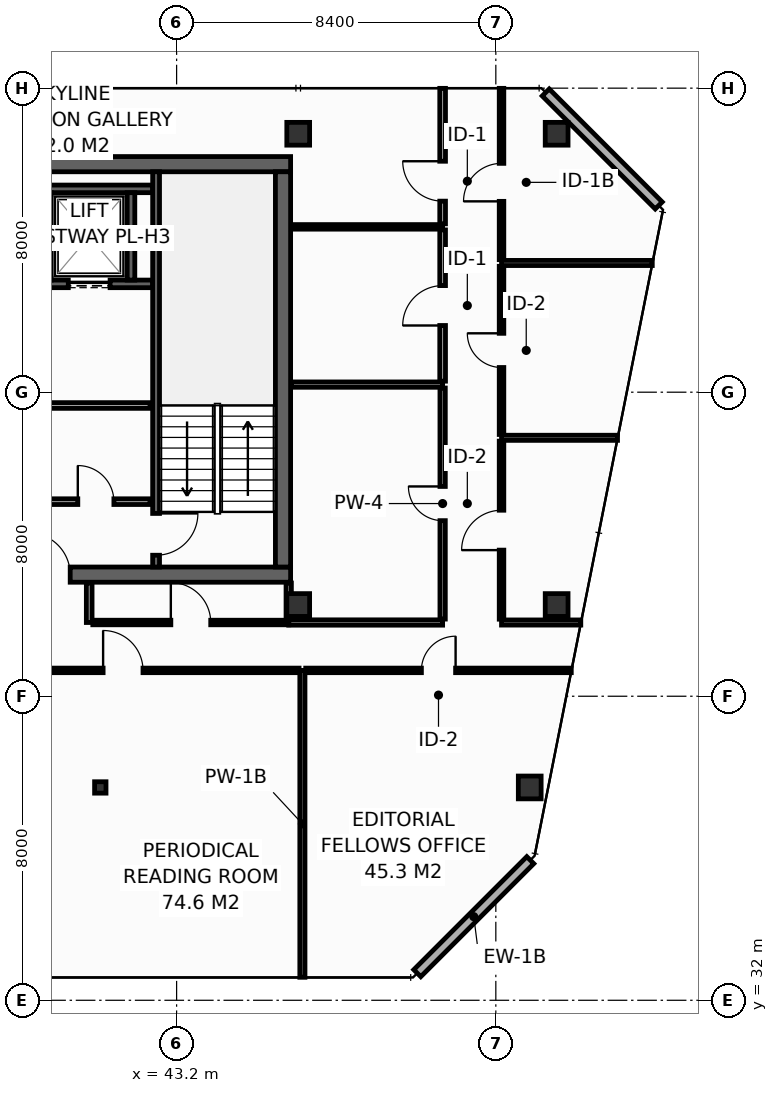
"""IFC4 building model, lengths in metres.
Left out: names, types, materials, properties, quantities, classifications, styles, units other than length and angle.
Written with IfcOpenShell. Run it as: python <this file> out.ifc"""

import sys

from ifc_helpers import new_model, si_unit, direction, frame, frame_2d, origin, origin_2d, place, context, subcontext, project, spatial, rectangle, hollow_rectangle, extrude, element, fill, save


model = new_model("IFC4")
c1 = context("Model", 3, precision=1e-05, world=origin(), true_north=direction((0.0, 1.0)))
c2 = subcontext(c1, "Body", "Model", "MODEL_VIEW")
j1 = project(units=[si_unit("LENGTHUNIT", "METRE"), si_unit("PLANEANGLEUNIT", "RADIAN")], contexts=[c1])
p1 = place(None, origin())
s1 = spatial("IfcSite", under=j1, at=p1, CompositionType="ELEMENT")
p2 = place(p1, origin())
s2 = spatial("IfcBuilding", under=s1, at=p2, CompositionType="ELEMENT")
p3 = place(p2, frame((0.0, 0.0, 299.0)))
s3 = spatial("IfcBuildingStorey", under=s2, at=p3, CompositionType="ELEMENT", Elevation=299.0)
p4 = place(p3, frame((13.7, 43.2, 0.0), z_axis=(0.0, 0.0, 1.0), x_axis=(1.0, 0.0, 0.0)))
e1 = element("IfcWall", 1, at=p4, inside=s3, PredefinedType="SHEAR", context=c2, shape_type="SweptSolid", body=[
    extrude(rectangle(XDim=32.5, YDim=0.4, at=frame_2d((16.25, 0.0))), origin(), (0.0, 0.0, 1.0), 3.55),
])
p5 = place(p4, frame((5.4, 0.0, 0.0)))
e2 = element("IfcOpeningElement", 2, at=p5, cuts=e1, PredefinedType="OPENING", context=c2, shape_type="SweptSolid", body=[
    extrude(rectangle(XDim=1.1, YDim=2.15, at=frame_2d((0.55, 1.075))), frame((0.0, 0.21, 0.0), z_axis=(0.0, -1.0, 0.0), x_axis=(1.0, 0.0, 0.0)), (0.0, 0.0, 1.0), 0.42),
])
p6 = place(p4, frame((25.6, 0.0, 0.0)))
e3 = element("IfcOpeningElement", 3, at=p6, cuts=e1, PredefinedType="OPENING", context=c2, shape_type="SweptSolid", body=[
    extrude(rectangle(XDim=1.1, YDim=2.15, at=frame_2d((0.55, 1.075))), frame((0.0, 0.21, 0.0), z_axis=(0.0, -1.0, 0.0), x_axis=(1.0, 0.0, 0.0)), (0.0, 0.0, 1.0), 0.42),
])
p7 = place(p3, frame((13.7, 54.0, 0.0), z_axis=(0.0, 0.0, 1.0), x_axis=(1.0, 0.0, 0.0)))
e4 = element("IfcWall", 4, at=p7, inside=s3, PredefinedType="SHEAR", context=c2, shape_type="SweptSolid", body=[
    extrude(rectangle(XDim=32.5, YDim=0.4, at=frame_2d((16.25, 0.0))), origin(), (0.0, 0.0, 1.0), 3.55),
])
p8 = place(p3, frame((46.0, 43.4, 0.0), z_axis=(0.0, 0.0, 1.0), x_axis=(0.0, 1.0, 0.0)))
e5 = element("IfcWall", 5, at=p8, inside=s3, PredefinedType="SHEAR", context=c2, shape_type="SweptSolid", body=[
    extrude(rectangle(XDim=10.4, YDim=0.4, at=frame_2d((5.2, 0.0))), origin(), (0.0, 0.0, 1.0), 3.55),
])
for number, where, z_axis, x_axis in (
    (6, (46.4, 54.8, 0.0), (0.0, 0.0, 1.0), (1.0, 0.0, 0.0)),
    (7, (53.2, 54.8, 0.0), (0.0, 0.0, 1.0), (1.0, 0.0, 0.0)),
    (8, (46.4, 42.4, 0.0), (0.0, 0.0, 1.0), (1.0, 0.0, 0.0)),
    (9, (53.2, 42.4, 0.0), (0.0, 0.0, 1.0), (1.0, 0.0, 0.0)),
    (10, (52.492, 37.6, 0.0), (0.0, 0.0, 1.0), (1.0, 0.0, 0.0)),
):
    element("IfcColumn", number, at=place(p3, frame(where, z_axis=z_axis, x_axis=x_axis)), inside=s3, PredefinedType="COLUMN", context=c2, shape_type="SweptSolid", body=[
        extrude(hollow_rectangle(XDim=0.6, YDim=0.6, WallThickness=0.028, at=origin_2d()), origin(), (0.0, 0.0, 1.0), 3.8),
    ])
p9 = place(p3, frame((41.192, 37.6, 0.0), z_axis=(0.0, 0.0, 1.0), x_axis=(1.0, 0.0, 0.0)))
e11 = element("IfcColumn", 11, at=p9, inside=s3, PredefinedType="COLUMN", context=c2, shape_type="SweptSolid", body=[
    extrude(hollow_rectangle(XDim=0.3, YDim=0.3, WallThickness=0.012, at=origin_2d()), origin(), (0.0, 0.0, 1.0), 3.8),
])
p10 = place(p3, frame((39.525, 50.85, 0.0), z_axis=(0.0, 0.0, 1.0), x_axis=(1.0, 0.0, 0.0)))
e12 = element("IfcWall", 12, at=p10, inside=s3, PredefinedType="SHEAR", context=c2, shape_type="SweptSolid", body=[
    extrude(rectangle(XDim=3.045, YDim=0.2, at=frame_2d((1.522, 0.0))), origin(), (0.0, 0.0, 1.0), 3.55),
])
p11 = place(p10, frame((0.825, 0.0, 0.0)))
e13 = element("IfcOpeningElement", 13, at=p11, cuts=e12, PredefinedType="OPENING", context=c2, shape_type="SweptSolid", body=[
    extrude(rectangle(XDim=1.1, YDim=2.2, at=frame_2d((0.55, 1.1))), frame((0.0, 0.11, 0.0), z_axis=(0.0, -1.0, 0.0), x_axis=(1.0, 0.0, 0.0)), (0.0, 0.0, 1.0), 0.22),
])
p12 = place(p3, frame((39.525, 53.35, 0.0), z_axis=(0.0, 0.0, 1.0), x_axis=(1.0, 0.0, 0.0)))
e14 = element("IfcWall", 14, at=p12, inside=s3, PredefinedType="SHEAR", context=c2, shape_type="SweptSolid", body=[
    extrude(rectangle(XDim=3.045, YDim=0.2, at=frame_2d((1.522, 0.0))), origin(), (0.0, 0.0, 1.0), 3.55),
])
p13 = place(p3, frame((42.0, 50.95, 0.0), z_axis=(0.0, 0.0, 1.0), x_axis=(0.0, 1.0, 0.0)))
e15 = element("IfcWall", 15, at=p13, inside=s3, PredefinedType="SHEAR", context=c2, shape_type="SweptSolid", body=[
    extrude(rectangle(XDim=2.3, YDim=0.2, at=frame_2d((1.15, 0.0))), origin(), (0.0, 0.0, 1.0), 3.55),
])
p14 = place(p3, frame((42.66, 53.8, 0.0), z_axis=(0.0, 0.0, 1.0), x_axis=(0.0, -1.0, 0.0)))
e16 = element("IfcWall", 16, at=p14, inside=s3, PredefinedType="SHEAR", context=c2, shape_type="SweptSolid", body=[
    extrude(rectangle(XDim=10.4, YDim=0.18, at=frame_2d((5.2, 0.0))), origin(), (0.0, 0.0, 1.0), 3.55),
])
p15 = place(p14, frame((8.99, 0.0, 0.0)))
e17 = element("IfcOpeningElement", 17, at=p15, cuts=e16, PredefinedType="OPENING", context=c2, shape_type="SweptSolid", body=[
    extrude(rectangle(XDim=1.1, YDim=2.15, at=frame_2d((0.55, 1.075))), frame((0.0, 0.1, 0.0), z_axis=(0.0, -1.0, 0.0), x_axis=(1.0, 0.0, 0.0)), (0.0, 0.0, 1.0), 0.2),
])
p16 = place(p3, frame((33.95, 45.12, 0.0), z_axis=(0.0, 0.0, 1.0), x_axis=(1.0, 0.0, 0.0)))
e18 = element("IfcWall", 18, at=p16, inside=s3, PredefinedType="PARTITIONING", context=c2, shape_type="SweptSolid", body=[
    extrude(rectangle(XDim=8.55, YDim=0.15, at=frame_2d((4.275, 0.0))), origin(), (0.0, 0.0, 1.0), 3.55),
])
p17 = place(p16, frame((0.95, 0.0, 0.0)))
e19 = element("IfcOpeningElement", 19, at=p17, cuts=e18, PredefinedType="OPENING", context=c2, shape_type="SweptSolid", body=[
    extrude(rectangle(XDim=0.95, YDim=2.15, at=frame_2d((0.475, 1.075))), frame((0.0, 0.085, 0.0), z_axis=(0.0, -1.0, 0.0), x_axis=(1.0, 0.0, 0.0)), (0.0, 0.0, 1.0), 0.17),
])
p18 = place(p16, frame((3.8, 0.0, 0.0)))
e20 = element("IfcOpeningElement", 20, at=p18, cuts=e18, PredefinedType="OPENING", context=c2, shape_type="SweptSolid", body=[
    extrude(rectangle(XDim=0.95, YDim=2.15, at=frame_2d((0.475, 1.075))), frame((0.0, 0.085, 0.0), z_axis=(0.0, -1.0, 0.0), x_axis=(1.0, 0.0, 0.0)), (0.0, 0.0, 1.0), 0.17),
])
p19 = place(p16, frame((6.65, 0.0, 0.0)))
e21 = element("IfcOpeningElement", 21, at=p19, cuts=e18, PredefinedType="OPENING", context=c2, shape_type="SweptSolid", body=[
    extrude(rectangle(XDim=0.95, YDim=2.15, at=frame_2d((0.475, 1.075))), frame((0.0, 0.085, 0.0), z_axis=(0.0, -1.0, 0.0), x_axis=(1.0, 0.0, 0.0)), (0.0, 0.0, 1.0), 0.17),
])
p20 = place(p3, frame((33.95, 47.65, 0.0), z_axis=(0.0, 0.0, 1.0), x_axis=(1.0, 0.0, 0.0)))
e22 = element("IfcWall", 22, at=p20, inside=s3, PredefinedType="PARTITIONING", context=c2, shape_type="SweptSolid", body=[
    extrude(rectangle(XDim=8.55, YDim=0.15, at=frame_2d((4.275, 0.0))), origin(), (0.0, 0.0, 1.0), 3.55),
])
p21 = place(p3, frame((49.533, 32.713, 0.0), z_axis=(0.0, 0.0, 1.0), x_axis=(0.70707775441, 0.707135806771, 0.0)))
e23 = element("IfcWall", 23, at=p21, inside=s3, PredefinedType="STANDARD", context=c2, shape_type="SweptSolid", body=[
    extrude(rectangle(XDim=4.206, YDim=0.26, at=frame_2d((2.103, 0.0))), origin(), (0.0, 0.0, 1.0), 3.55),
])
p22 = place(p3, frame((55.887, 52.913, 0.0), z_axis=(0.0, 0.0, 1.0), x_axis=(-0.707106781187, 0.707106781187, 0.0)))
e24 = element("IfcWall", 24, at=p22, inside=s3, PredefinedType="STANDARD", context=c2, shape_type="SweptSolid", body=[
    extrude(rectangle(XDim=4.206, YDim=0.26, at=frame_2d((2.103, 0.0))), origin(), (0.0, 0.0, 1.0), 3.55),
])
p23 = place(p3, frame((46.15, 41.94, 0.0), z_axis=(0.0, 0.0, 1.0), x_axis=(1.0, 0.0, 0.0)))
e25 = element("IfcWall", 25, at=p23, inside=s3, PredefinedType="PARTITIONING", context=c2, shape_type="SweptSolid", body=[
    extrude(rectangle(XDim=4.05, YDim=0.14, at=frame_2d((2.025, 0.0))), origin(), (0.0, 0.0, 1.0), 3.55),
])
p24 = place(p3, frame((46.15, 42.03, 0.0), z_axis=(0.0, 0.0, 1.0), x_axis=(0.0, 1.0, 0.0)))
e26 = element("IfcWall", 26, at=p24, inside=s3, PredefinedType="PARTITIONING", context=c2, shape_type="SweptSolid", body=[
    extrude(rectangle(XDim=0.95, YDim=0.14, at=frame_2d((0.475, 0.0))), origin(), (0.0, 0.0, 1.0), 3.55),
])
p25 = place(p3, frame((46.22, 48.2, 0.0), z_axis=(0.0, 0.0, 1.0), x_axis=(1.0, 0.0, 0.0)))
e27 = element("IfcWall", 27, at=p25, inside=s3, PredefinedType="PARTITIONING", context=c2, shape_type="SweptSolid", body=[
    extrude(rectangle(XDim=3.98, YDim=0.14, at=frame_2d((1.99, 0.0))), origin(), (0.0, 0.0, 1.0), 3.55),
])
p26 = place(p3, frame((50.2, 42.03, 0.0), z_axis=(0.0, 0.0, 1.0), x_axis=(0.0, 1.0, 0.0)))
e28 = element("IfcWall", 28, at=p26, inside=s3, PredefinedType="PARTITIONING", context=c2, shape_type="SweptSolid", body=[
    extrude(rectangle(XDim=6.08, YDim=0.14, at=frame_2d((3.04, 0.0))), origin(), (0.0, 0.0, 1.0), 2.947),
])
p27 = place(p26, frame((2.59, 0.0, 0.0)))
e29 = element("IfcOpeningElement", 29, at=p27, cuts=e28, PredefinedType="OPENING", context=c2, shape_type="SweptSolid", body=[
    extrude(rectangle(XDim=0.9, YDim=2.1, at=frame_2d((0.45, 1.05))), frame((0.0, 0.08, 0.0), z_axis=(0.0, -1.0, 0.0), x_axis=(1.0, 0.0, 0.0)), (0.0, 0.0, 1.0), 0.16),
])
p28 = place(p3, frame((46.22, 52.35, 0.0), z_axis=(0.0, 0.0, 1.0), x_axis=(1.0, 0.0, 0.0)))
e30 = element("IfcWall", 30, at=p28, inside=s3, PredefinedType="PARTITIONING", context=c2, shape_type="SweptSolid", body=[
    extrude(rectangle(XDim=3.98, YDim=0.12, at=frame_2d((1.99, 0.0))), origin(), (0.0, 0.0, 1.0), 3.55),
])
p29 = place(p3, frame((50.2, 48.29, 0.0), z_axis=(0.0, 0.0, 1.0), x_axis=(0.0, 1.0, 0.0)))
e31 = element("IfcWall", 31, at=p29, inside=s3, PredefinedType="PARTITIONING", context=c2, shape_type="SweptSolid", body=[
    extrude(rectangle(XDim=3.98, YDim=0.15, at=frame_2d((1.99, 0.0))), origin(), (0.0, 0.0, 1.0), 3.55),
])
p30 = place(p29, frame((1.465, 0.0, 0.0)))
e32 = element("IfcOpeningElement", 32, at=p30, cuts=e31, PredefinedType="OPENING", context=c2, shape_type="SweptSolid", body=[
    extrude(rectangle(XDim=1.05, YDim=2.15, at=frame_2d((0.525, 1.075))), frame((0.0, 0.085, 0.0), z_axis=(0.0, -1.0, 0.0), x_axis=(1.0, 0.0, 0.0)), (0.0, 0.0, 1.0), 0.17),
])
p31 = place(p3, frame((50.2, 52.43, 0.0), z_axis=(0.0, 0.0, 1.0), x_axis=(0.0, 1.0, 0.0)))
e33 = element("IfcWall", 33, at=p31, inside=s3, PredefinedType="PARTITIONING", context=c2, shape_type="SweptSolid", body=[
    extrude(rectangle(XDim=3.565, YDim=0.15, at=frame_2d((1.783, 0.0))), origin(), (0.0, 0.0, 1.0), 2.935),
])
p32 = place(p31, frame((0.597, 0.0, 0.0)))
e34 = element("IfcOpeningElement", 34, at=p32, cuts=e33, PredefinedType="OPENING", context=c2, shape_type="SweptSolid", body=[
    extrude(rectangle(XDim=1.05, YDim=2.15, at=frame_2d((0.525, 1.075))), frame((0.0, 0.085, 0.0), z_axis=(0.0, -1.0, 0.0), x_axis=(1.0, 0.0, 0.0)), (0.0, 0.0, 1.0), 0.17),
])
p33 = place(p3, frame((51.75, 41.94, 0.0), z_axis=(0.0, 0.0, 1.0), x_axis=(1.0, 0.0, 0.0)))
e35 = element("IfcWall", 35, at=p33, inside=s3, PredefinedType="PARTITIONING", context=c2, shape_type="SweptSolid", body=[
    extrude(rectangle(XDim=2.086, YDim=0.135, at=frame_2d((1.043, 0.0))), origin(), (0.0, 0.0, 1.0), 3.085),
])
p34 = place(p3, frame((51.75, 46.8, 0.0), z_axis=(0.0, 0.0, 1.0), x_axis=(1.0, 0.0, 0.0)))
e36 = element("IfcWall", 36, at=p34, inside=s3, PredefinedType="PARTITIONING", context=c2, shape_type="SweptSolid", body=[
    extrude(rectangle(XDim=3.052, YDim=0.135, at=frame_2d((1.526, 0.0))), origin(), (0.0, 0.0, 1.0), 2.947),
])
p35 = place(p3, frame((51.75, 51.4, 0.0), z_axis=(0.0, 0.0, 1.0), x_axis=(1.0, 0.0, 0.0)))
e37 = element("IfcWall", 37, at=p35, inside=s3, PredefinedType="PARTITIONING", context=c2, shape_type="SweptSolid", body=[
    extrude(rectangle(XDim=3.967, YDim=0.135, at=frame_2d((1.983, 0.0))), origin(), (0.0, 0.0, 1.0), 2.947),
])
p36 = place(p3, frame((51.75, 42.028, 0.0), z_axis=(0.0, 0.0, 1.0), x_axis=(0.0, 1.0, 0.0)))
e38 = element("IfcWall", 38, at=p36, inside=s3, PredefinedType="PARTITIONING", context=c2, shape_type="SweptSolid", body=[
    extrude(rectangle(XDim=4.685, YDim=0.12, at=frame_2d((2.342, 0.0))), origin(), (0.0, 0.0, 1.0), 2.947),
])
p37 = place(p36, frame((1.817, 0.0, 0.0)))
e39 = element("IfcOpeningElement", 39, at=p37, cuts=e38, PredefinedType="OPENING", context=c2, shape_type="SweptSolid", body=[
    extrude(rectangle(XDim=1.05, YDim=2.15, at=frame_2d((0.525, 1.075))), frame((0.0, 0.07, 0.0), z_axis=(0.0, -1.0, 0.0), x_axis=(1.0, 0.0, 0.0)), (0.0, 0.0, 1.0), 0.14),
])
p38 = place(p3, frame((51.75, 46.887, 0.0), z_axis=(0.0, 0.0, 1.0), x_axis=(0.0, 1.0, 0.0)))
e40 = element("IfcWall", 40, at=p38, inside=s3, PredefinedType="PARTITIONING", context=c2, shape_type="SweptSolid", body=[
    extrude(rectangle(XDim=4.425, YDim=0.12, at=frame_2d((2.212, 0.0))), origin(), (0.0, 0.0, 1.0), 3.55),
])
p39 = place(p38, frame((1.762, 0.0, 0.0)))
e41 = element("IfcOpeningElement", 41, at=p39, cuts=e40, PredefinedType="OPENING", context=c2, shape_type="SweptSolid", body=[
    extrude(rectangle(XDim=0.9, YDim=2.1, at=frame_2d((0.45, 1.05))), frame((0.0, 0.07, 0.0), z_axis=(0.0, -1.0, 0.0), x_axis=(1.0, 0.0, 0.0)), (0.0, 0.0, 1.0), 0.14),
])
p40 = place(p3, frame((51.75, 51.488, 0.0), z_axis=(0.0, 0.0, 1.0), x_axis=(0.0, 1.0, 0.0)))
e42 = element("IfcWall", 42, at=p40, inside=s3, PredefinedType="PARTITIONING", context=c2, shape_type="SweptSolid", body=[
    extrude(rectangle(XDim=4.508, YDim=0.12, at=frame_2d((2.254, 0.0))), origin(), (0.0, 0.0, 1.0), 2.935),
])
p41 = place(p40, frame((1.534, 0.0, 0.0)))
e43 = element("IfcOpeningElement", 43, at=p41, cuts=e42, PredefinedType="OPENING", context=c2, shape_type="SweptSolid", body=[
    extrude(rectangle(XDim=1.0, YDim=2.15, at=frame_2d((0.5, 1.075))), frame((0.0, 0.07, 0.0), z_axis=(0.0, -1.0, 0.0), x_axis=(1.0, 0.0, 0.0)), (0.0, 0.0, 1.0), 0.14),
])
p42 = place(p3, frame((40.9, 41.94, 0.0), z_axis=(0.0, 0.0, 1.0), x_axis=(0.0, 1.0, 0.0)))
e44 = element("IfcWall", 44, at=p42, inside=s3, PredefinedType="PARTITIONING", context=c2, shape_type="SweptSolid", body=[
    extrude(rectangle(XDim=1.04, YDim=0.15, at=frame_2d((0.52, 0.0))), origin(), (0.0, 0.0, 1.0), 3.55),
])
p43 = place(p3, frame((40.995, 41.94, 0.0), z_axis=(0.0, 0.0, 1.0), x_axis=(1.0, 0.0, 0.0)))
e45 = element("IfcWall", 45, at=p43, inside=s3, PredefinedType="PARTITIONING", context=c2, shape_type="SweptSolid", body=[
    extrude(rectangle(XDim=5.155, YDim=0.12, at=frame_2d((2.577, 0.0))), origin(), (0.0, 0.0, 1.0), 3.55),
])
p44 = place(p43, frame((2.053, 0.0, 0.0)))
e46 = element("IfcOpeningElement", 46, at=p44, cuts=e45, PredefinedType="OPENING", context=c2, shape_type="SweptSolid", body=[
    extrude(rectangle(XDim=1.05, YDim=2.15, at=frame_2d((0.525, 1.075))), frame((0.0, 0.07, 0.0), z_axis=(0.0, -1.0, 0.0), x_axis=(1.0, 0.0, 0.0)), (0.0, 0.0, 1.0), 0.14),
])
p45 = place(p3, frame((46.51, 32.605, 0.0), z_axis=(0.0, 0.0, 1.0), x_axis=(0.0, 1.0, 0.0)))
e47 = element("IfcWall", 47, at=p45, inside=s3, PredefinedType="PARTITIONING", context=c2, shape_type="SweptSolid", body=[
    extrude(rectangle(XDim=8.075, YDim=0.135, at=frame_2d((4.038, 0.0))), origin(), (0.0, 0.0, 1.0), 3.047),
])
p46 = place(p3, frame((37.16, 40.68, 0.0), z_axis=(0.0, 0.0, 1.0), x_axis=(1.0, 0.0, 0.0)))
e48 = element("IfcWall", 48, at=p46, inside=s3, PredefinedType="PARTITIONING", context=c2, shape_type="SweptSolid", body=[
    extrude(rectangle(XDim=9.263, YDim=0.12, at=frame_2d((4.631, 0.0))), origin(), (0.0, 0.0, 1.0), 3.047),
])
p47 = place(p46, frame((4.106, 0.0, 0.0)))
e49 = element("IfcOpeningElement", 49, at=p47, cuts=e48, PredefinedType="OPENING", context=c2, shape_type="SweptSolid", body=[
    extrude(rectangle(XDim=1.05, YDim=2.15, at=frame_2d((0.525, 1.075))), frame((0.0, 0.07, 0.0), z_axis=(0.0, -1.0, 0.0), x_axis=(1.0, 0.0, 0.0)), (0.0, 0.0, 1.0), 0.14),
])
p48 = place(p3, frame((46.597, 40.68, 0.0), z_axis=(0.0, 0.0, 1.0), x_axis=(1.0, 0.0, 0.0)))
e50 = element("IfcWall", 50, at=p48, inside=s3, PredefinedType="PARTITIONING", context=c2, shape_type="SweptSolid", body=[
    extrude(rectangle(XDim=6.988, YDim=0.12, at=frame_2d((3.494, 0.0))), origin(), (0.0, 0.0, 1.0), 3.085),
])
p49 = place(p48, frame((3.044, 0.0, 0.0)))
e51 = element("IfcOpeningElement", 51, at=p49, cuts=e50, PredefinedType="OPENING", context=c2, shape_type="SweptSolid", body=[
    extrude(rectangle(XDim=0.9, YDim=2.1, at=frame_2d((0.45, 1.05))), frame((0.0, 0.07, 0.0), z_axis=(0.0, -1.0, 0.0), x_axis=(1.0, 0.0, 0.0)), (0.0, 0.0, 1.0), 0.14),
])
p50 = place(p11, origin())
e52 = element("IfcDoor", 52, at=p50, inside=s3, OperationType="SLIDING_TO_LEFT", PredefinedType="DOOR", context=c2, shape_type="SweptSolid", body=[
    extrude(rectangle(XDim=1.1, YDim=2.2, at=frame_2d((0.55, 1.1))), frame((0.0, 0.025, 0.0), z_axis=(0.0, -1.0, 0.0), x_axis=(1.0, 0.0, 0.0)), (0.0, 0.0, 1.0), 0.05),
])
fill(e13, e52)
p51 = place(p15, origin())
e53 = element("IfcDoor", 53, at=p51, inside=s3, OperationType="SINGLE_SWING_LEFT", PredefinedType="DOOR", context=c2, shape_type="SweptSolid", body=[
    extrude(rectangle(XDim=1.1, YDim=2.15, at=frame_2d((0.55, 1.075))), frame((0.0, 0.025, 0.0), z_axis=(0.0, -1.0, 0.0), x_axis=(1.0, 0.0, 0.0)), (0.0, 0.0, 1.0), 0.05),
])
fill(e17, e53)
p52 = place(p6, origin())
e54 = element("IfcDoor", 54, at=p52, inside=s3, OperationType="SINGLE_SWING_LEFT", PredefinedType="DOOR", context=c2, shape_type="SweptSolid", body=[
    extrude(rectangle(XDim=1.1, YDim=2.15, at=frame_2d((0.55, 1.075))), frame((0.0, 0.025, 0.0), z_axis=(0.0, -1.0, 0.0), x_axis=(1.0, 0.0, 0.0)), (0.0, 0.0, 1.0), 0.05),
])
fill(e3, e54)
p53 = place(p19, origin())
e55 = element("IfcDoor", 55, at=p53, inside=s3, OperationType="SINGLE_SWING_LEFT", PredefinedType="DOOR", context=c2, shape_type="SweptSolid", body=[
    extrude(rectangle(XDim=0.95, YDim=2.15, at=frame_2d((0.475, 1.075))), frame((0.0, 0.025, 0.0), z_axis=(0.0, -1.0, 0.0), x_axis=(1.0, 0.0, 0.0)), (0.0, 0.0, 1.0), 0.05),
])
fill(e21, e55)
p54 = place(p27, origin())
e56 = element("IfcDoor", 56, at=p54, inside=s3, OperationType="SINGLE_SWING_RIGHT", PredefinedType="DOOR", context=c2, shape_type="SweptSolid", body=[
    extrude(rectangle(XDim=0.9, YDim=2.1, at=frame_2d((0.45, 1.05))), frame((0.0, 0.025, 0.0), z_axis=(0.0, -1.0, 0.0), x_axis=(1.0, 0.0, 0.0)), (0.0, 0.0, 1.0), 0.05),
])
fill(e29, e56)
p55 = place(p30, origin())
e57 = element("IfcDoor", 57, at=p55, inside=s3, OperationType="SINGLE_SWING_LEFT", PredefinedType="DOOR", context=c2, shape_type="SweptSolid", body=[
    extrude(rectangle(XDim=1.05, YDim=2.15, at=frame_2d((0.525, 1.075))), frame((0.0, 0.025, 0.0), z_axis=(0.0, -1.0, 0.0), x_axis=(1.0, 0.0, 0.0)), (0.0, 0.0, 1.0), 0.05),
])
fill(e32, e57)
p56 = place(p32, origin())
e58 = element("IfcDoor", 58, at=p56, inside=s3, OperationType="SINGLE_SWING_RIGHT", PredefinedType="DOOR", context=c2, shape_type="SweptSolid", body=[
    extrude(rectangle(XDim=1.05, YDim=2.15, at=frame_2d((0.525, 1.075))), frame((0.0, 0.025, 0.0), z_axis=(0.0, -1.0, 0.0), x_axis=(1.0, 0.0, 0.0)), (0.0, 0.0, 1.0), 0.05),
])
fill(e34, e58)
p57 = place(p37, origin())
e59 = element("IfcDoor", 59, at=p57, inside=s3, OperationType="SINGLE_SWING_LEFT", PredefinedType="DOOR", context=c2, shape_type="SweptSolid", body=[
    extrude(rectangle(XDim=1.05, YDim=2.15, at=frame_2d((0.525, 1.075))), frame((0.0, 0.025, 0.0), z_axis=(0.0, -1.0, 0.0), x_axis=(1.0, 0.0, 0.0)), (0.0, 0.0, 1.0), 0.05),
])
fill(e39, e59)
p58 = place(p39, origin())
e60 = element("IfcDoor", 60, at=p58, inside=s3, OperationType="SINGLE_SWING_RIGHT", PredefinedType="DOOR", context=c2, shape_type="SweptSolid", body=[
    extrude(rectangle(XDim=0.9, YDim=2.1, at=frame_2d((0.45, 1.05))), frame((0.0, 0.025, 0.0), z_axis=(0.0, -1.0, 0.0), x_axis=(1.0, 0.0, 0.0)), (0.0, 0.0, 1.0), 0.05),
])
fill(e41, e60)
p59 = place(p41, origin())
e61 = element("IfcDoor", 61, at=p59, inside=s3, OperationType="SINGLE_SWING_LEFT", PredefinedType="DOOR", context=c2, shape_type="SweptSolid", body=[
    extrude(rectangle(XDim=1.0, YDim=2.15, at=frame_2d((0.5, 1.075))), frame((0.0, 0.025, 0.0), z_axis=(0.0, -1.0, 0.0), x_axis=(1.0, 0.0, 0.0)), (0.0, 0.0, 1.0), 0.05),
])
fill(e43, e61)
p60 = place(p44, origin())
e62 = element("IfcDoor", 62, at=p60, inside=s3, OperationType="SINGLE_SWING_LEFT", PredefinedType="DOOR", context=c2, shape_type="SweptSolid", body=[
    extrude(rectangle(XDim=1.05, YDim=2.15, at=frame_2d((0.525, 1.075))), frame((0.0, 0.025, 0.0), z_axis=(0.0, -1.0, 0.0), x_axis=(1.0, 0.0, 0.0)), (0.0, 0.0, 1.0), 0.05),
])
fill(e46, e62)
p61 = place(p47, origin())
e63 = element("IfcDoor", 63, at=p61, inside=s3, OperationType="SINGLE_SWING_LEFT", PredefinedType="DOOR", context=c2, shape_type="SweptSolid", body=[
    extrude(rectangle(XDim=1.05, YDim=2.15, at=frame_2d((0.525, 1.075))), frame((0.0, 0.025, 0.0), z_axis=(0.0, -1.0, 0.0), x_axis=(1.0, 0.0, 0.0)), (0.0, 0.0, 1.0), 0.05),
])
fill(e49, e63)
p62 = place(p49, origin())
e64 = element("IfcDoor", 64, at=p62, inside=s3, OperationType="SINGLE_SWING_RIGHT", PredefinedType="DOOR", context=c2, shape_type="SweptSolid", body=[
    extrude(rectangle(XDim=0.9, YDim=2.1, at=frame_2d((0.45, 1.05))), frame((0.0, 0.025, 0.0), z_axis=(0.0, -1.0, 0.0), x_axis=(1.0, 0.0, 0.0)), (0.0, 0.0, 1.0), 0.05),
])
fill(e51, e64)
save(model, sys.argv[1])
